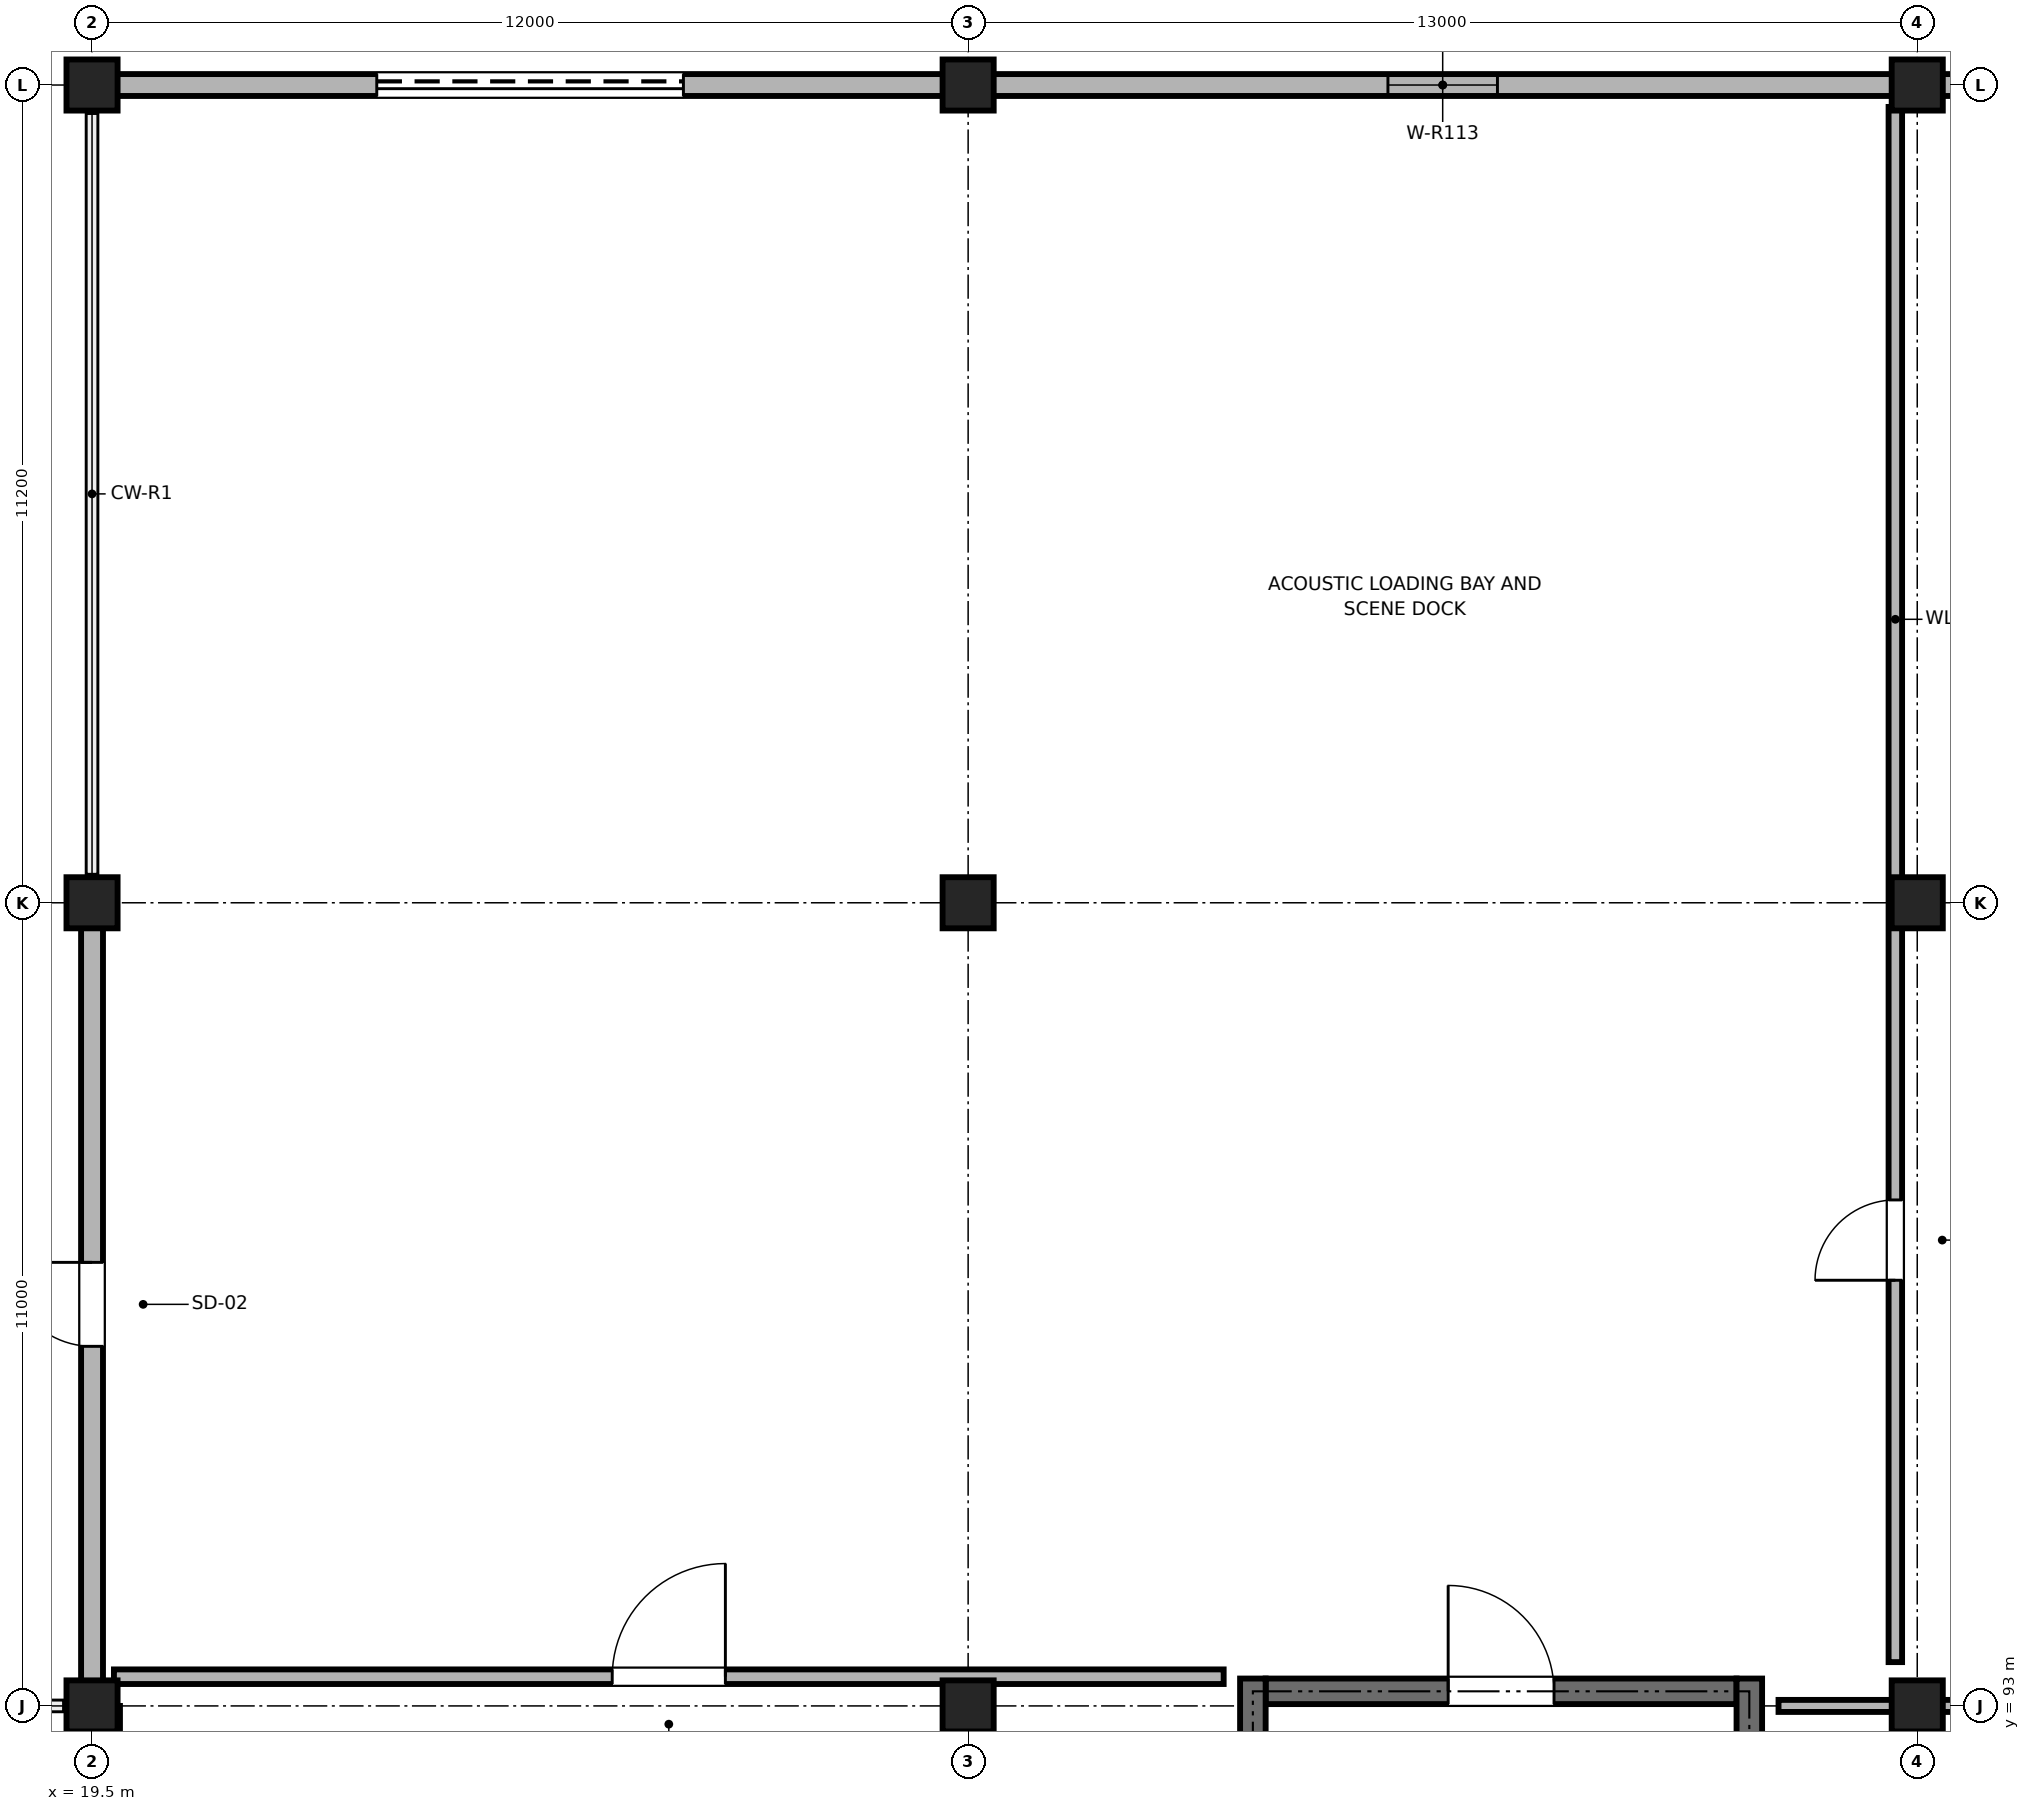
"""IFC4 building model, lengths in metres.
Left out: names, types, materials, properties, quantities, classifications, styles, units other than length and angle.
Written with IfcOpenShell. Run it as: python <this file> out.ifc"""

import sys

from ifc_helpers import new_model, si_unit, direction, frame, frame_2d, origin, origin_2d, place, context, subcontext, project, spatial, rectangle, extrude, element, fill, save


model = new_model("IFC4")
c1 = context("Model", 3, precision=1e-05, world=origin(), true_north=direction((0.0, 1.0)))
c2 = subcontext(c1, "Body", "Model", "MODEL_VIEW")
j1 = project(units=[si_unit("LENGTHUNIT", "METRE"), si_unit("PLANEANGLEUNIT", "RADIAN")], contexts=[c1])
p1 = place(None, origin())
s1 = spatial("IfcSite", under=j1, at=p1, CompositionType="ELEMENT")
p2 = place(p1, origin())
s2 = spatial("IfcBuilding", under=s1, at=p2, CompositionType="ELEMENT")
p3 = place(p2, origin())
s3 = spatial("IfcBuildingStorey", under=s2, at=p3, CompositionType="ELEMENT", Elevation=0.0)
for number, where, z_axis, x_axis in (
    (1, (19.5, 93.0, 0.0), (0.0, 0.0, 1.0), (1.0, 0.0, 0.0)),
    (2, (19.5, 104.0, 0.0), (0.0, 0.0, 1.0), (1.0, 0.0, 0.0)),
    (3, (19.5, 115.2, 0.0), (0.0, 0.0, 1.0), (1.0, 0.0, 0.0)),
    (4, (31.5, 93.0, 0.0), (0.0, 0.0, 1.0), (1.0, 0.0, 0.0)),
    (5, (31.5, 104.0, 0.0), (0.0, 0.0, 1.0), (1.0, 0.0, 0.0)),
    (6, (31.5, 115.2, 0.0), (0.0, 0.0, 1.0), (1.0, 0.0, 0.0)),
    (7, (44.5, 93.0, 0.0), (0.0, 0.0, 1.0), (1.0, 0.0, 0.0)),
    (8, (44.5, 104.0, 0.0), (0.0, 0.0, 1.0), (1.0, 0.0, 0.0)),
    (9, (44.5, 115.2, 0.0), (0.0, 0.0, 1.0), (1.0, 0.0, 0.0)),
):
    element("IfcColumn", number, at=place(p3, frame(where, z_axis=z_axis, x_axis=x_axis)), inside=s3, PredefinedType="COLUMN", context=c2, shape_type="SweptSolid", body=[
        extrude(rectangle(XDim=0.7, YDim=0.7, at=origin_2d()), origin(), (0.0, 0.0, 1.0), 4.8),
    ])
p4 = place(p3, frame((44.52, 115.2, 0.0), z_axis=(0.0, 0.0, 1.0), x_axis=(1.0, 0.0, 0.0)))
e10 = element("IfcWall", 10, at=p4, inside=s3, PredefinedType="SOLIDWALL", context=c2, shape_type="SweptSolid", body=[
    extrude(rectangle(XDim=12.96, YDim=0.3, at=frame_2d((6.48, 0.0))), origin(), (0.0, 0.0, 1.0), 3.958),
])
p5 = place(p4, frame((5.805, 0.0, 0.9)))
e11 = element("IfcOpeningElement", 11, at=p5, cuts=e10, PredefinedType="OPENING", context=c2, shape_type="SweptSolid", body=[
    extrude(rectangle(XDim=1.35, YDim=1.55, at=frame_2d((0.675, 0.775))), frame((0.0, 0.16, 0.0), z_axis=(0.0, -1.0, 0.0), x_axis=(1.0, 0.0, 0.0)), (0.0, 0.0, 1.0), 0.32),
])
p6 = place(p3, frame((31.52, 115.2, 0.0), z_axis=(0.0, 0.0, 1.0), x_axis=(1.0, 0.0, 0.0)))
e12 = element("IfcWall", 12, at=p6, inside=s3, PredefinedType="SOLIDWALL", context=c2, shape_type="SweptSolid", body=[
    extrude(rectangle(XDim=12.96, YDim=0.3, at=frame_2d((6.48, 0.0))), origin(), (0.0, 0.0, 1.0), 3.958),
])
p7 = place(p6, frame((5.73, 0.0, 0.9)))
e13 = element("IfcOpeningElement", 13, at=p7, cuts=e12, PredefinedType="OPENING", context=c2, shape_type="SweptSolid", body=[
    extrude(rectangle(XDim=1.5, YDim=1.55, at=frame_2d((0.75, 0.775))), frame((0.0, 0.16, 0.0), z_axis=(0.0, -1.0, 0.0), x_axis=(1.0, 0.0, 0.0)), (0.0, 0.0, 1.0), 0.32),
])
p8 = place(p3, frame((19.52, 115.2, 0.0), z_axis=(0.0, 0.0, 1.0), x_axis=(1.0, 0.0, 0.0)))
e14 = element("IfcWall", 14, at=p8, inside=s3, PredefinedType="SOLIDWALL", context=c2, shape_type="SweptSolid", body=[
    extrude(rectangle(XDim=11.96, YDim=0.3, at=frame_2d((5.98, 0.0))), origin(), (0.0, 0.0, 1.0), 3.958),
])
p9 = place(p8, frame((3.88, 0.0, 0.0)))
e15 = element("IfcOpeningElement", 15, at=p9, cuts=e14, PredefinedType="OPENING", context=c2, shape_type="SweptSolid", body=[
    extrude(rectangle(XDim=4.2, YDim=3.4, at=frame_2d((2.1, 1.7))), frame((0.0, 0.16, 0.0), z_axis=(0.0, -1.0, 0.0), x_axis=(1.0, 0.0, 0.0)), (0.0, 0.0, 1.0), 0.32),
])
p10 = place(p3, frame((19.5, 93.02, 0.0), z_axis=(0.0, 0.0, 1.0), x_axis=(0.0, 1.0, 0.0)))
e16 = element("IfcWall", 16, at=p10, inside=s3, PredefinedType="SOLIDWALL", context=c2, shape_type="SweptSolid", body=[
    extrude(rectangle(XDim=10.96, YDim=0.3, at=frame_2d((5.48, 0.0))), origin(), (0.0, 0.0, 1.0), 3.958),
])
p11 = place(p10, frame((4.905, 0.0, 0.0)))
e17 = element("IfcOpeningElement", 17, at=p11, cuts=e16, PredefinedType="OPENING", context=c2, shape_type="SweptSolid", body=[
    extrude(rectangle(XDim=1.15, YDim=2.12, at=frame_2d((0.575, 1.06))), frame((0.0, 0.16, 0.0), z_axis=(0.0, -1.0, 0.0), x_axis=(1.0, 0.0, 0.0)), (0.0, 0.0, 1.0), 0.32),
])
p12 = place(p3, frame((35.575, 93.2, 0.0), z_axis=(0.0, 0.0, 1.0), x_axis=(1.0, 0.0, 0.0)))
e18 = element("IfcWall", 18, at=p12, inside=s3, PredefinedType="SHEAR", context=c2, shape_type="SweptSolid", body=[
    extrude(rectangle(XDim=6.45, YDim=0.35, at=frame_2d((3.225, 0.0))), origin(), (0.0, 0.0, 1.0), 4.52),
])
p13 = place(p12, frame((2.5, 0.0, 0.0)))
e19 = element("IfcOpeningElement", 19, at=p13, cuts=e18, PredefinedType="OPENING", context=c2, shape_type="SweptSolid", body=[
    extrude(rectangle(XDim=1.45, YDim=2.2, at=frame_2d((0.725, 1.1))), frame((0.0, 0.185, 0.0), z_axis=(0.0, -1.0, 0.0), x_axis=(1.0, 0.0, 0.0)), (0.0, 0.0, 1.0), 0.37),
])
for number, where, z_axis, x_axis in (
    (20, (35.4, 81.775, 0.0), (0.0, 0.0, 1.0), (0.0, 1.0, 0.0)),
    (21, (42.2, 81.775, 0.0), (0.0, 0.0, 1.0), (0.0, 1.0, 0.0)),
):
    element("IfcWall", number, at=place(p3, frame(where, z_axis=z_axis, x_axis=x_axis)), inside=s3, PredefinedType="SHEAR", context=c2, shape_type="SweptSolid", body=[
        extrude(rectangle(XDim=11.6, YDim=0.35, at=frame_2d((5.8, 0.0))), origin(), (0.0, 0.0, 1.0), 4.52),
    ])
p14 = place(p3, frame((19.8, 81.6, 0.0), z_axis=(0.0, 0.0, 1.0), x_axis=(0.0, 1.0, 0.0)))
e22 = element("IfcWall", 22, at=p14, inside=s3, PredefinedType="PARTITIONING", context=c2, shape_type="SweptSolid", body=[
    extrude(rectangle(XDim=11.4, YDim=0.165, at=frame_2d((5.7, 0.0))), origin(), (0.0, 0.0, 1.0), 3.96),
])
p15 = place(p14, frame((8.257, 0.0, 0.0)))
e23 = element("IfcOpeningElement", 23, at=p15, cuts=e22, PredefinedType="OPENING", context=c2, shape_type="SweptSolid", body=[
    extrude(rectangle(XDim=1.05, YDim=2.15, at=frame_2d((0.525, 1.075))), frame((0.0, 0.093, 0.0), z_axis=(0.0, -1.0, 0.0), x_axis=(1.0, 0.0, 0.0)), (0.0, 0.0, 1.0), 0.185),
])
p16 = place(p3, frame((42.6, 93.0, 0.0), z_axis=(0.0, 0.0, 1.0), x_axis=(1.0, 0.0, 0.0)))
e24 = element("IfcWall", 24, at=p16, inside=s3, PredefinedType="PARTITIONING", context=c2, shape_type="SweptSolid", body=[
    extrude(rectangle(XDim=7.8, YDim=0.165, at=frame_2d((3.9, 0.0))), origin(), (0.0, 0.0, 1.0), 3.96),
])
p17 = place(p16, frame((3.44, 0.0, 0.0)))
e25 = element("IfcOpeningElement", 25, at=p17, cuts=e24, PredefinedType="OPENING", context=c2, shape_type="SweptSolid", body=[
    extrude(rectangle(XDim=0.92, YDim=2.1, at=frame_2d((0.46, 1.05))), frame((0.0, 0.093, 0.0), z_axis=(0.0, -1.0, 0.0), x_axis=(1.0, 0.0, 0.0)), (0.0, 0.0, 1.0), 0.185),
])
p18 = place(p3, frame((44.2, 93.6, 0.0), z_axis=(0.0, 0.0, 1.0), x_axis=(0.0, 1.0, 0.0)))
e26 = element("IfcWall", 26, at=p18, inside=s3, PredefinedType="PARTITIONING", context=c2, shape_type="SweptSolid", body=[
    extrude(rectangle(XDim=21.3, YDim=0.185, at=frame_2d((10.65, 0.0))), origin(), (0.0, 0.0, 1.0), 3.96),
])
p19 = place(p18, frame((5.23, 0.0, 0.0)))
e27 = element("IfcOpeningElement", 27, at=p19, cuts=e26, PredefinedType="OPENING", context=c2, shape_type="SweptSolid", body=[
    extrude(rectangle(XDim=1.1, YDim=2.15, at=frame_2d((0.55, 1.075))), frame((0.0, 0.103, 0.0), z_axis=(0.0, -1.0, 0.0), x_axis=(1.0, 0.0, 0.0)), (0.0, 0.0, 1.0), 0.205),
])
p20 = place(p3, frame((19.8, 93.4, 0.0), z_axis=(0.0, 0.0, 1.0), x_axis=(1.0, 0.0, 0.0)))
e28 = element("IfcWall", 28, at=p20, inside=s3, PredefinedType="PARTITIONING", context=c2, shape_type="SweptSolid", body=[
    extrude(rectangle(XDim=15.2, YDim=0.2, at=frame_2d((7.6, 0.0))), origin(), (0.0, 0.0, 1.0), 3.96),
])
p21 = place(p20, frame((6.825, 0.0, 0.0)))
e29 = element("IfcOpeningElement", 29, at=p21, cuts=e28, PredefinedType="OPENING", context=c2, shape_type="SweptSolid", body=[
    extrude(rectangle(XDim=1.55, YDim=2.18, at=frame_2d((0.775, 1.09))), frame((0.0, 0.11, 0.0), z_axis=(0.0, -1.0, 0.0), x_axis=(1.0, 0.0, 0.0)), (0.0, 0.0, 1.0), 0.22),
])
p22 = place(p7, origin())
e30 = element("IfcWindow", 30, at=p22, inside=s3, PartitioningType="SINGLE_PANEL", PredefinedType="WINDOW", context=c2, shape_type="SweptSolid", body=[
    extrude(rectangle(XDim=1.5, YDim=1.55, at=frame_2d((0.75, 0.775))), frame((0.0, 0.03, 0.0), z_axis=(0.0, -1.0, 0.0), x_axis=(1.0, 0.0, 0.0)), (0.0, 0.0, 1.0), 0.06),
])
fill(e13, e30)
p23 = place(p9, origin())
e31 = element("IfcDoor", 31, at=p23, inside=s3, OperationType="ROLLINGUP", PredefinedType="GATE", context=c2, shape_type="SweptSolid", body=[
    extrude(rectangle(XDim=4.2, YDim=3.4, at=frame_2d((2.1, 1.7))), frame((0.0, 0.025, 0.0), z_axis=(0.0, -1.0, 0.0), x_axis=(1.0, 0.0, 0.0)), (0.0, 0.0, 1.0), 0.05),
])
fill(e15, e31)
p24 = place(p11, origin())
e32 = element("IfcDoor", 32, at=p24, inside=s3, OperationType="SINGLE_SWING_RIGHT", PredefinedType="DOOR", context=c2, shape_type="SweptSolid", body=[
    extrude(rectangle(XDim=1.15, YDim=2.12, at=frame_2d((0.575, 1.06))), frame((0.0, 0.025, 0.0), z_axis=(0.0, -1.0, 0.0), x_axis=(1.0, 0.0, 0.0)), (0.0, 0.0, 1.0), 0.05),
])
fill(e17, e32)
p25 = place(p13, origin())
e33 = element("IfcDoor", 33, at=p25, inside=s3, OperationType="SINGLE_SWING_LEFT", PredefinedType="DOOR", context=c2, shape_type="SweptSolid", body=[
    extrude(rectangle(XDim=1.45, YDim=2.2, at=frame_2d((0.725, 1.1))), frame((0.0, 0.025, 0.0), z_axis=(0.0, -1.0, 0.0), x_axis=(1.0, 0.0, 0.0)), (0.0, 0.0, 1.0), 0.05),
])
fill(e19, e33)
p26 = place(p19, origin())
e34 = element("IfcDoor", 34, at=p26, inside=s3, OperationType="SINGLE_SWING_LEFT", PredefinedType="DOOR", context=c2, shape_type="SweptSolid", body=[
    extrude(rectangle(XDim=1.1, YDim=2.15, at=frame_2d((0.55, 1.075))), frame((0.0, 0.025, 0.0), z_axis=(0.0, -1.0, 0.0), x_axis=(1.0, 0.0, 0.0)), (0.0, 0.0, 1.0), 0.05),
])
fill(e27, e34)
p27 = place(p21, origin())
e35 = element("IfcDoor", 35, at=p27, inside=s3, OperationType="SINGLE_SWING_RIGHT", PredefinedType="DOOR", context=c2, shape_type="SweptSolid", body=[
    extrude(rectangle(XDim=1.55, YDim=2.18, at=frame_2d((0.775, 1.09))), frame((0.0, 0.025, 0.0), z_axis=(0.0, -1.0, 0.0), x_axis=(1.0, 0.0, 0.0)), (0.0, 0.0, 1.0), 0.05),
])
fill(e29, e35)
save(model, sys.argv[1])
